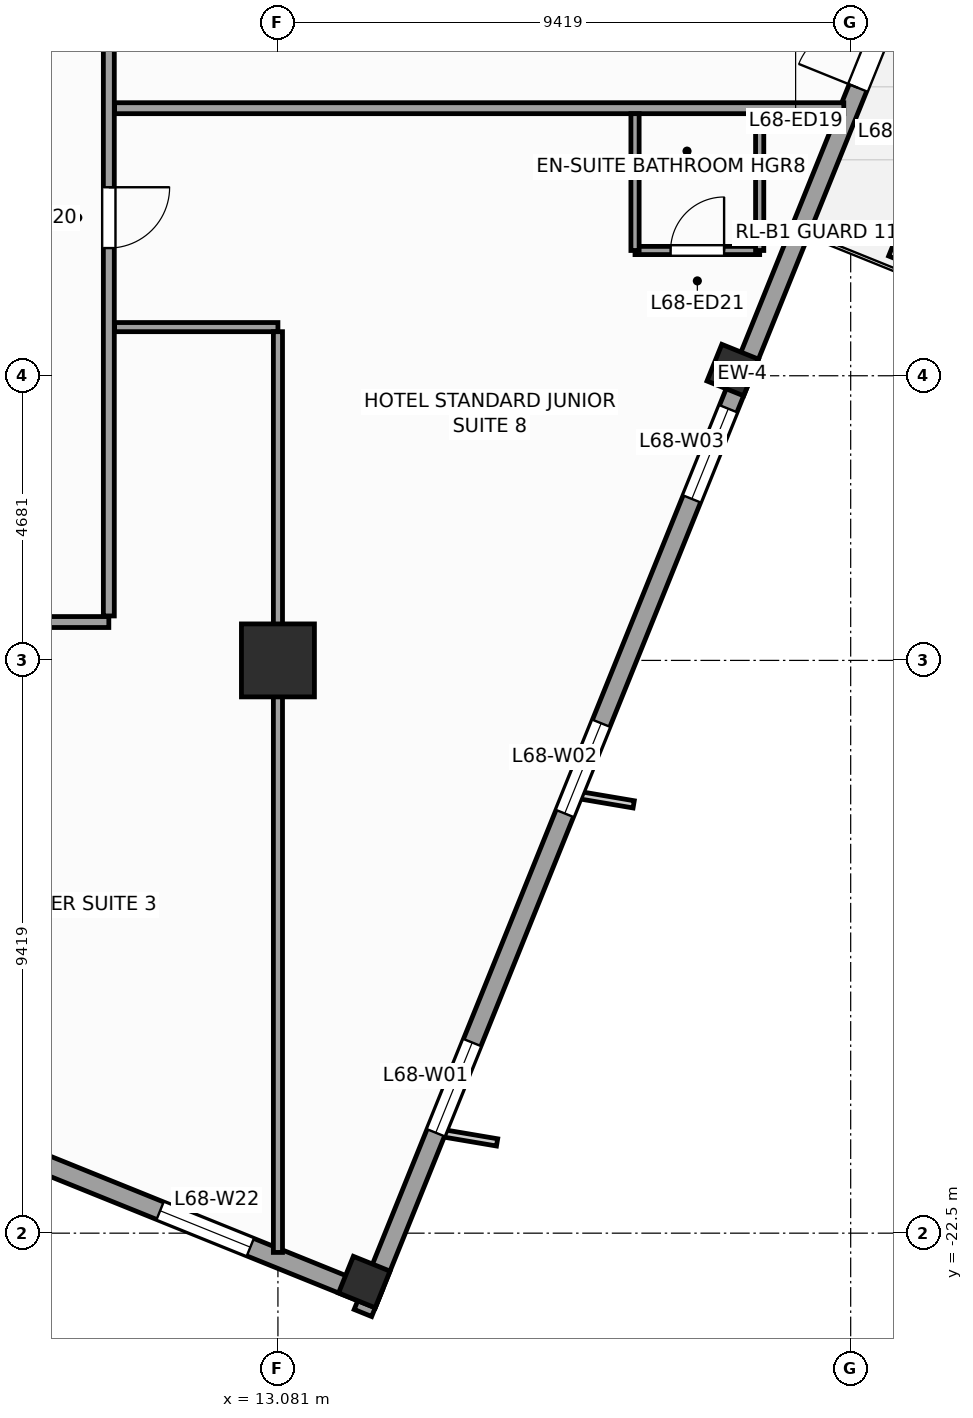
"""IFC4 building model, lengths in metres.
Left out: names, types, materials, properties, quantities, classifications, styles, units other than length and angle.
Written with IfcOpenShell. Run it as: python <this file> out.ifc"""

import sys

from ifc_helpers import new_model, si_unit, direction, frame, frame_2d, origin, origin_2d, place, context, subcontext, project, spatial, rectangle, extrude, source, transform, mapped, element, fill, save


model = new_model("IFC4")
c1 = context("Model", 3, precision=1e-05, world=origin(), true_north=direction((0.0, 1.0)))
c2 = subcontext(c1, "Body", "Model", "MODEL_VIEW")
j1 = project(units=[si_unit("LENGTHUNIT", "METRE"), si_unit("PLANEANGLEUNIT", "RADIAN")], contexts=[c1])
p1 = place(None, origin())
s1 = spatial("IfcSite", under=j1, at=p1, CompositionType="ELEMENT")
p2 = place(p1, origin())
s2 = spatial("IfcBuilding", under=s1, at=p2, CompositionType="ELEMENT")
p3 = place(p2, frame((0.0, 0.0, 279.6)))
s3 = spatial("IfcBuildingStorey", under=s2, at=p3, CompositionType="ELEMENT", Elevation=279.6)
m1 = source(origin(), c2, "Body", "SweptSolid", [
    extrude(rectangle(XDim=1.2, YDim=1.2, at=origin_2d()), origin(), (0.0, 0.0, 1.0), 3.6),
])
p4 = place(p3, frame((13.081, -13.081, 0.0), z_axis=(0.0, 0.0, 1.0), x_axis=(1.0, 0.0, 0.0)))
e1 = element("IfcColumn", 1, at=p4, inside=s3, PredefinedType="COLUMN", context=c2, shape_type="MappedRepresentation", body=[
    mapped(m1, transform((0.0, 0.0, 0.0), scale=1.0)),
])
m2 = source(origin(), c2, "Body", "SweptSolid", [
    extrude(rectangle(XDim=0.65, YDim=0.65, at=origin_2d()), origin(), (0.0, 0.0, 1.0), 3.6),
])
for number, where, z_axis, x_axis in (
    (2, (14.501, -23.304, 0.0), (0.0, 0.0, 1.0), (0.375, 0.927, 0.0)),
    (3, (20.56, -8.307, 0.0), (0.0, 0.0, 1.0), (0.375, 0.927, 0.0)),
):
    element("IfcColumn", number, at=place(p3, frame(where, z_axis=z_axis, x_axis=x_axis)), inside=s3, PredefinedType="COLUMN", context=c2, shape_type="MappedRepresentation", body=[
        mapped(m2, transform((0.0, 0.0, 0.0), scale=1.0)),
    ])
p5 = place(p3, frame((14.479, -23.813, 0.0), z_axis=(0.0, 0.0, 1.0), x_axis=(0.374609557019, 0.927182657188, 0.0)))
e4 = element("IfcWall", 4, at=p5, inside=s3, PredefinedType="STANDARD", context=c2, shape_type="SweptSolid", body=[
    extrude(rectangle(XDim=33.31, YDim=0.31, at=frame_2d((16.655, 0.0))), origin(), (0.0, 0.0, 1.0), 2.75),
])
p6 = place(p5, frame((21.73, 0.0, 0.0)))
e5 = element("IfcOpeningElement", 5, at=p6, cuts=e4, PredefinedType="OPENING", context=c2, shape_type="SweptSolid", body=[
    extrude(rectangle(XDim=1.05, YDim=2.25, at=frame_2d((0.525, 1.125))), frame((0.0, 0.165, 0.0), z_axis=(0.0, -1.0, 0.0), x_axis=(1.0, 0.0, 0.0)), (0.0, 0.0, 1.0), 0.33),
])
p7 = place(p5, frame((3.197, 0.0, 0.47)))
e6 = element("IfcOpeningElement", 6, at=p7, cuts=e4, PredefinedType="OPENING", context=c2, shape_type="SweptSolid", body=[
    extrude(rectangle(XDim=1.6, YDim=2.1, at=frame_2d((0.8, 1.05))), frame((0.0, 0.165, 0.0), z_axis=(0.0, -1.0, 0.0), x_axis=(1.0, 0.0, 0.0)), (0.0, 0.0, 1.0), 0.33),
])
p8 = place(p5, frame((8.86, 0.0, 0.47)))
e7 = element("IfcOpeningElement", 7, at=p8, cuts=e4, PredefinedType="OPENING", context=c2, shape_type="SweptSolid", body=[
    extrude(rectangle(XDim=1.6, YDim=2.1, at=frame_2d((0.8, 1.05))), frame((0.0, 0.165, 0.0), z_axis=(0.0, -1.0, 0.0), x_axis=(1.0, 0.0, 0.0)), (0.0, 0.0, 1.0), 0.33),
])
p9 = place(p5, frame((14.439, 0.0, 0.47)))
e8 = element("IfcOpeningElement", 8, at=p9, cuts=e4, PredefinedType="OPENING", context=c2, shape_type="SweptSolid", body=[
    extrude(rectangle(XDim=1.6, YDim=2.1, at=frame_2d((0.8, 1.05))), frame((0.0, 0.165, 0.0), z_axis=(0.0, -1.0, 0.0), x_axis=(1.0, 0.0, 0.0)), (0.0, 0.0, 1.0), 0.33),
])
p10 = place(p5, frame((27.847, 0.0, 0.47)))
e9 = element("IfcOpeningElement", 9, at=p10, cuts=e4, PredefinedType="OPENING", context=c2, shape_type="SweptSolid", body=[
    extrude(rectangle(XDim=1.6, YDim=2.1, at=frame_2d((0.8, 1.05))), frame((0.0, 0.165, 0.0), z_axis=(0.0, -1.0, 0.0), x_axis=(1.0, 0.0, 0.0)), (0.0, 0.0, 1.0), 0.33),
])
p11 = place(p3, frame((9.032, -21.278, 0.0), z_axis=(0.0, 0.0, 1.0), x_axis=(0.927185411764, -0.374602739196, 0.0)))
e10 = element("IfcWall", 10, at=p11, inside=s3, PredefinedType="STANDARD", context=c2, shape_type="SweptSolid", body=[
    extrude(rectangle(XDim=6.155, YDim=0.31, at=frame_2d((3.078, 0.0))), origin(), (0.0, 0.0, 1.0), 3.35),
])
p12 = place(p11, frame((2.278, 0.0, 0.47)))
e11 = element("IfcOpeningElement", 11, at=p12, cuts=e10, PredefinedType="OPENING", context=c2, shape_type="SweptSolid", body=[
    extrude(rectangle(XDim=1.6, YDim=2.1, at=frame_2d((0.8, 1.05))), frame((0.0, 0.165, 0.0), z_axis=(0.0, -1.0, 0.0), x_axis=(1.0, 0.0, 0.0)), (0.0, 0.0, 1.0), 0.33),
])
p13 = place(p3, frame((-11.45, -12.45, 0.0), z_axis=(0.0, 0.0, 1.0), x_axis=(1.0, 0.0, 0.0)))
e12 = element("IfcWall", 12, at=p13, inside=s3, PredefinedType="PARTITIONING", context=c2, shape_type="SweptSolid", body=[
    extrude(rectangle(XDim=21.75, YDim=0.18, at=frame_2d((10.875, 0.0))), origin(), (0.0, 0.0, 1.0), 3.35),
])
p14 = place(p13, frame((12.436, 0.0, 0.0)))
e13 = element("IfcOpeningElement", 13, at=p14, cuts=e12, PredefinedType="OPENING", context=c2, shape_type="SweptSolid", body=[
    extrude(rectangle(XDim=0.95, YDim=2.1, at=frame_2d((0.475, 1.05))), frame((0.0, 0.1, 0.0), z_axis=(0.0, -1.0, 0.0), x_axis=(1.0, 0.0, 0.0)), (0.0, 0.0, 1.0), 0.2),
])
p15 = place(p13, frame((18.186, 0.0, 0.0)))
e14 = element("IfcOpeningElement", 14, at=p15, cuts=e12, PredefinedType="OPENING", context=c2, shape_type="SweptSolid", body=[
    extrude(rectangle(XDim=1.0, YDim=2.15, at=frame_2d((0.5, 1.075))), frame((0.0, 0.1, 0.0), z_axis=(0.0, -1.0, 0.0), x_axis=(1.0, 0.0, 0.0)), (0.0, 0.0, 1.0), 0.2),
])
p16 = place(p13, frame((14.5, 0.0, 0.0)))
e15 = element("IfcOpeningElement", 15, at=p16, cuts=e12, PredefinedType="OPENING", context=c2, shape_type="SweptSolid", body=[
    extrude(rectangle(XDim=1.0, YDim=2.15, at=frame_2d((0.5, 1.075))), frame((0.0, 0.1, 0.0), z_axis=(0.0, -1.0, 0.0), x_axis=(1.0, 0.0, 0.0)), (0.0, 0.0, 1.0), 0.2),
])
p17 = place(p13, frame((8.7, 0.0, 0.0)))
e16 = element("IfcOpeningElement", 16, at=p17, cuts=e12, PredefinedType="OPENING", context=c2, shape_type="SweptSolid", body=[
    extrude(rectangle(XDim=1.0, YDim=2.15, at=frame_2d((0.5, 1.075))), frame((0.0, 0.1, 0.0), z_axis=(0.0, -1.0, 0.0), x_axis=(1.0, 0.0, 0.0)), (0.0, 0.0, 1.0), 0.2),
])
p18 = place(p13, frame((3.139, 0.0, 0.0)))
e17 = element("IfcOpeningElement", 17, at=p18, cuts=e12, PredefinedType="OPENING", context=c2, shape_type="SweptSolid", body=[
    extrude(rectangle(XDim=1.0, YDim=2.15, at=frame_2d((0.5, 1.075))), frame((0.0, 0.1, 0.0), z_axis=(0.0, -1.0, 0.0), x_axis=(1.0, 0.0, 0.0)), (0.0, 0.0, 1.0), 0.2),
])
p19 = place(p3, frame((10.3, -12.35, 0.0), z_axis=(0.0, 0.0, 1.0), x_axis=(0.0, 1.0, 0.0)))
e18 = element("IfcWall", 18, at=p19, inside=s3, PredefinedType="PARTITIONING", context=c2, shape_type="SweptSolid", body=[
    extrude(rectangle(XDim=23.7, YDim=0.18, at=frame_2d((11.85, 0.0))), origin(), (0.0, 0.0, 1.0), 3.35),
])
p20 = place(p19, frame((17.65, 0.0, 0.0)))
e19 = element("IfcOpeningElement", 19, at=p20, cuts=e18, PredefinedType="OPENING", context=c2, shape_type="SweptSolid", body=[
    extrude(rectangle(XDim=1.0, YDim=2.15, at=frame_2d((0.5, 1.075))), frame((0.0, 0.1, 0.0), z_axis=(0.0, -1.0, 0.0), x_axis=(1.0, 0.0, 0.0)), (0.0, 0.0, 1.0), 0.2),
])
p21 = place(p19, frame((13.85, 0.0, 0.0)))
e20 = element("IfcOpeningElement", 20, at=p21, cuts=e18, PredefinedType="OPENING", context=c2, shape_type="SweptSolid", body=[
    extrude(rectangle(XDim=1.0, YDim=2.15, at=frame_2d((0.5, 1.075))), frame((0.0, 0.1, 0.0), z_axis=(0.0, -1.0, 0.0), x_axis=(1.0, 0.0, 0.0)), (0.0, 0.0, 1.0), 0.2),
])
p22 = place(p19, frame((9.85, 0.0, 0.0)))
e21 = element("IfcOpeningElement", 21, at=p22, cuts=e18, PredefinedType="OPENING", context=c2, shape_type="SweptSolid", body=[
    extrude(rectangle(XDim=1.0, YDim=2.15, at=frame_2d((0.5, 1.075))), frame((0.0, 0.1, 0.0), z_axis=(0.0, -1.0, 0.0), x_axis=(1.0, 0.0, 0.0)), (0.0, 0.0, 1.0), 0.2),
])
p23 = place(p19, frame((6.05, 0.0, 0.0)))
e22 = element("IfcOpeningElement", 22, at=p23, cuts=e18, PredefinedType="OPENING", context=c2, shape_type="SweptSolid", body=[
    extrude(rectangle(XDim=1.0, YDim=2.15, at=frame_2d((0.5, 1.075))), frame((0.0, 0.1, 0.0), z_axis=(0.0, -1.0, 0.0), x_axis=(1.0, 0.0, 0.0)), (0.0, 0.0, 1.0), 0.2),
])
p24 = place(p3, frame((10.395, -4.0, 0.0), z_axis=(0.0, 0.0, 1.0), x_axis=(1.0, 0.0, 0.0)))
e23 = element("IfcWall", 23, at=p24, inside=s3, PredefinedType="PARTITIONING", context=c2, shape_type="SweptSolid", body=[
    extrude(rectangle(XDim=11.992, YDim=0.18, at=frame_2d((5.996, 0.0))), origin(), (0.0, 0.0, 1.0), 3.35),
])
p25 = place(p3, frame((10.395, -7.6, 0.0), z_axis=(0.0, 0.0, 1.0), x_axis=(1.0, 0.0, 0.0)))
e24 = element("IfcWall", 24, at=p25, inside=s3, PredefinedType="PARTITIONING", context=c2, shape_type="SweptSolid", body=[
    extrude(rectangle(XDim=2.686, YDim=0.15, at=frame_2d((1.343, 0.0))), origin(), (0.0, 0.0, 1.0), 3.35),
])
p26 = place(p3, frame((13.081, -7.675, 0.0), z_axis=(0.0, 0.0, 1.0), x_axis=(0.0, -1.0, 0.0)))
e25 = element("IfcWall", 25, at=p26, inside=s3, PredefinedType="PARTITIONING", context=c2, shape_type="SweptSolid", body=[
    extrude(rectangle(XDim=15.142, YDim=0.15, at=frame_2d((7.571, 0.0))), origin(), (0.0, 0.0, 1.0), 2.45),
])
p27 = place(p3, frame((18.953, -6.34, 0.0), z_axis=(0.0, 0.0, 1.0), x_axis=(1.0, 0.0, 0.0)))
e26 = element("IfcWall", 26, at=p27, inside=s3, PredefinedType="PARTITIONING", context=c2, shape_type="SweptSolid", body=[
    extrude(rectangle(XDim=2.05, YDim=0.135, at=frame_2d((1.025, 0.0))), origin(), (0.0, 0.0, 1.0), 3.35),
])
p28 = place(p27, frame((0.585, 0.0, 0.0)))
e27 = element("IfcOpeningElement", 27, at=p28, cuts=e26, PredefinedType="OPENING", context=c2, shape_type="SweptSolid", body=[
    extrude(rectangle(XDim=0.88, YDim=2.1, at=frame_2d((0.44, 1.05))), frame((0.0, 0.078, 0.0), z_axis=(0.0, -1.0, 0.0), x_axis=(1.0, 0.0, 0.0)), (0.0, 0.0, 1.0), 0.155),
])
for number, where, z_axis, x_axis in (
    (28, (21.003, -6.34, 0.0), (0.0, 0.0, 1.0), (0.0, 1.0, 0.0)),
    (29, (18.953, -6.34, 0.0), (0.0, 0.0, 1.0), (0.0, 1.0, 0.0)),
):
    element("IfcWall", number, at=place(p3, frame(where, z_axis=z_axis, x_axis=x_axis)), inside=s3, PredefinedType="PARTITIONING", context=c2, shape_type="SweptSolid", body=[
        extrude(rectangle(XDim=2.25, YDim=0.135, at=frame_2d((1.125, 0.0))), origin(), (0.0, 0.0, 1.0), 3.35),
    ])
m3 = source(origin(), c2, "Body", "SweptSolid", [
    extrude(rectangle(XDim=1.05, YDim=2.25, at=frame_2d((0.525, 1.125))), frame((0.0, 0.025, 0.0), z_axis=(0.0, -1.0, 0.0), x_axis=(1.0, 0.0, 0.0)), (0.0, 0.0, 1.0), 0.05),
])
p29 = place(p6, origin())
e30 = element("IfcDoor", 30, at=p29, inside=s3, OperationType="SINGLE_SWING_LEFT", PredefinedType="DOOR", context=c2, shape_type="MappedRepresentation", body=[
    mapped(m3, transform((0.0, 0.0, 0.0), scale=1.0)),
])
fill(e5, e30)
m4 = source(origin(), c2, "Body", "SweptSolid", [
    extrude(rectangle(XDim=1.6, YDim=2.1, at=frame_2d((0.8, 1.05))), frame((0.0, 0.03, 0.0), z_axis=(0.0, -1.0, 0.0), x_axis=(1.0, 0.0, 0.0)), (0.0, 0.0, 1.0), 0.06),
])
p30 = place(p7, origin())
e31 = element("IfcWindow", 31, at=p30, inside=s3, PartitioningType="SINGLE_PANEL", PredefinedType="WINDOW", context=c2, shape_type="MappedRepresentation", body=[
    mapped(m4, transform((0.0, 0.0, 0.0), scale=1.0)),
])
fill(e6, e31)
p31 = place(p8, origin())
e32 = element("IfcWindow", 32, at=p31, inside=s3, PartitioningType="SINGLE_PANEL", PredefinedType="WINDOW", context=c2, shape_type="MappedRepresentation", body=[
    mapped(m4, transform((0.0, 0.0, 0.0), scale=1.0)),
])
fill(e7, e32)
p32 = place(p9, origin())
e33 = element("IfcWindow", 33, at=p32, inside=s3, PartitioningType="SINGLE_PANEL", PredefinedType="WINDOW", context=c2, shape_type="MappedRepresentation", body=[
    mapped(m4, transform((0.0, 0.0, 0.0), scale=1.0)),
])
fill(e8, e33)
p33 = place(p12, origin())
e34 = element("IfcWindow", 34, at=p33, inside=s3, PartitioningType="SINGLE_PANEL", PredefinedType="WINDOW", context=c2, shape_type="MappedRepresentation", body=[
    mapped(m4, transform((0.0, 0.0, 0.0), scale=1.0)),
])
fill(e11, e34)
m5 = source(origin(), c2, "Body", "SweptSolid", [
    extrude(rectangle(XDim=1.0, YDim=2.15, at=frame_2d((0.5, 1.075))), frame((0.0, 0.025, 0.0), z_axis=(0.0, -1.0, 0.0), x_axis=(1.0, 0.0, 0.0)), (0.0, 0.0, 1.0), 0.05),
])
p34 = place(p23, frame((1.0, 0.0, 0.0), z_axis=(0.0, 0.0, 1.0), x_axis=(-1.0, 0.0, 0.0)))
e35 = element("IfcDoor", 35, at=p34, inside=s3, OperationType="SINGLE_SWING_RIGHT", PredefinedType="DOOR", context=c2, shape_type="MappedRepresentation", body=[
    mapped(m5, transform((0.0, 0.0, 0.0), scale=1.0)),
])
fill(e22, e35)
m6 = source(origin(), c2, "Body", "SweptSolid", [
    extrude(rectangle(XDim=0.88, YDim=2.1, at=frame_2d((0.44, 1.05))), frame((0.0, 0.025, 0.0), z_axis=(0.0, -1.0, 0.0), x_axis=(1.0, 0.0, 0.0)), (0.0, 0.0, 1.0), 0.05),
])
p35 = place(p28, origin())
e36 = element("IfcDoor", 36, at=p35, inside=s3, OperationType="SINGLE_SWING_RIGHT", PredefinedType="DOOR", context=c2, shape_type="MappedRepresentation", body=[
    mapped(m6, transform((0.0, 0.0, 0.0), scale=1.0)),
])
fill(e27, e36)
save(model, sys.argv[1])
